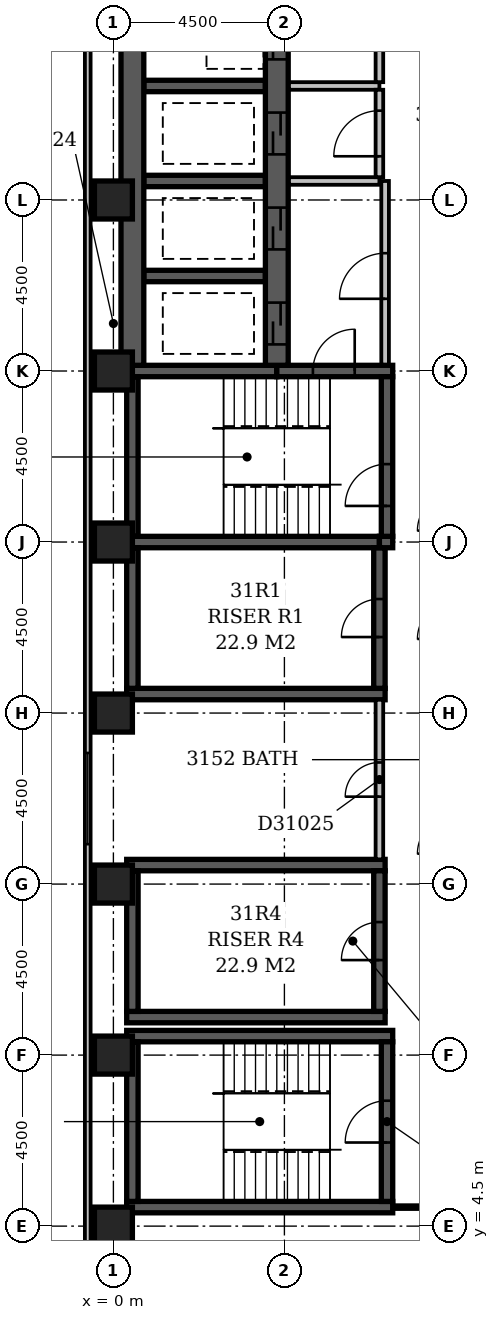
"""IFC4 building model, lengths in metres.
Left out: names, types, materials, properties, quantities, classifications, styles, units other than length and angle.
Written with IfcOpenShell. Run it as: python <this file> out.ifc"""

import sys

from ifc_helpers import new_model, si_unit, direction, frame, frame_2d, origin, origin_2d, place, context, subcontext, project, spatial, rectangle, extrude, element, fill, save


model = new_model("IFC4")
c1 = context("Model", 3, precision=1e-05, world=origin(), true_north=direction((0.0, 1.0)))
c2 = subcontext(c1, "Body", "Model", "MODEL_VIEW")
j1 = project(units=[si_unit("LENGTHUNIT", "METRE"), si_unit("PLANEANGLEUNIT", "RADIAN")], contexts=[c1])
p1 = place(None, origin())
s1 = spatial("IfcSite", under=j1, at=p1, CompositionType="ELEMENT")
p2 = place(p1, origin())
s2 = spatial("IfcBuilding", under=s1, at=p2, CompositionType="ELEMENT")
p3 = place(p2, frame((0.0, 0.0, 126.8)))
s3 = spatial("IfcBuildingStorey", under=s2, at=p3, CompositionType="ELEMENT", Elevation=126.8)
for number, where, z_axis, x_axis in (
    (1, (0.35, 5.0, -0.3), (0.0, 0.0, 1.0), (1.0, 0.0, 0.0)),
    (2, (0.35, 9.5, -0.3), (0.0, 0.0, 1.0), (1.0, 0.0, 0.0)),
):
    element("IfcWall", number, at=place(p3, frame(where, z_axis=z_axis, x_axis=x_axis)), inside=s3, PredefinedType="SHEAR", context=c2, shape_type="SweptSolid", body=[
        extrude(rectangle(XDim=7.0, YDim=0.3, at=frame_2d((3.5, 0.0))), origin(), (0.0, 0.0, 1.0), 3.6),
    ])
for number, where, z_axis, x_axis in (
    (3, (0.35, 10.0, -0.3), (0.0, 0.0, 1.0), (1.0, 0.0, 0.0)),
    (4, (0.35, 14.0, -0.3), (0.0, 0.0, 1.0), (1.0, 0.0, 0.0)),
    (5, (0.35, 18.5, -0.3), (0.0, 0.0, 1.0), (1.0, 0.0, 0.0)),
):
    element("IfcWall", number, at=place(p3, frame(where, z_axis=z_axis, x_axis=x_axis)), inside=s3, PredefinedType="SHEAR", context=c2, shape_type="SweptSolid", body=[
        extrude(rectangle(XDim=6.8, YDim=0.3, at=frame_2d((3.4, 0.0))), origin(), (0.0, 0.0, 1.0), 3.6),
    ])
p4 = place(p3, frame((0.35, 22.5, -0.3), z_axis=(0.0, 0.0, 1.0), x_axis=(1.0, 0.0, 0.0)))
e6 = element("IfcWall", 6, at=p4, inside=s3, PredefinedType="SHEAR", context=c2, shape_type="SweptSolid", body=[
    extrude(rectangle(XDim=6.65, YDim=0.3, at=frame_2d((3.325, 0.0))), origin(), (0.0, 0.0, 1.0), 3.6),
])
p5 = place(p3, frame((0.35, 27.0, -0.3), z_axis=(0.0, 0.0, 1.0), x_axis=(1.0, 0.0, 0.0)))
e7 = element("IfcWall", 7, at=p5, inside=s3, PredefinedType="SHEAR", context=c2, shape_type="SweptSolid", body=[
    extrude(rectangle(XDim=3.95, YDim=0.3, at=frame_2d((1.975, 0.0))), origin(), (0.0, 0.0, 1.0), 3.6),
])
p6 = place(p3, frame((0.5, 5.15, -0.3), z_axis=(0.0, 0.0, 1.0), x_axis=(0.0, 1.0, 0.0)))
e8 = element("IfcWall", 8, at=p6, inside=s3, PredefinedType="SHEAR", context=c2, shape_type="SweptSolid", body=[
    extrude(rectangle(XDim=4.2, YDim=0.3, at=frame_2d((2.1, 0.0))), origin(), (0.0, 0.0, 1.0), 3.6),
])
for number, where, z_axis, x_axis in (
    (9, (0.5, 10.15, -0.3), (0.0, 0.0, 1.0), (0.0, 1.0, 0.0)),
    (10, (0.5, 18.65, -0.3), (0.0, 0.0, 1.0), (0.0, 1.0, 0.0)),
):
    element("IfcWall", number, at=place(p3, frame(where, z_axis=z_axis, x_axis=x_axis)), inside=s3, PredefinedType="SHEAR", context=c2, shape_type="SweptSolid", body=[
        extrude(rectangle(XDim=3.7, YDim=0.3, at=frame_2d((1.85, 0.0))), origin(), (0.0, 0.0, 1.0), 3.6),
    ])
p7 = place(p3, frame((0.5, 22.65, -0.3), z_axis=(0.0, 0.0, 1.0), x_axis=(0.0, 1.0, 0.0)))
e11 = element("IfcWall", 11, at=p7, inside=s3, PredefinedType="SHEAR", context=c2, shape_type="SweptSolid", body=[
    extrude(rectangle(XDim=4.2, YDim=0.3, at=frame_2d((2.1, 0.0))), origin(), (0.0, 0.0, 1.0), 3.6),
])
p8 = place(p3, frame((0.5, 27.15, -0.3), z_axis=(0.0, 0.0, 1.0), x_axis=(0.0, 1.0, 0.0)))
e12 = element("IfcWall", 12, at=p8, inside=s3, PredefinedType="SHEAR", context=c2, shape_type="SweptSolid", body=[
    extrude(rectangle(XDim=22.05, YDim=0.6, at=frame_2d((11.025, 0.0))), origin(), (0.0, 0.0, 1.0), 3.6),
])
for number, where, z_axis, x_axis in (
    (13, (0.8, 29.5, -0.3), (0.0, 0.0, 1.0), (1.0, 0.0, 0.0)),
    (14, (0.8, 32.0, -0.3), (0.0, 0.0, 1.0), (1.0, 0.0, 0.0)),
    (15, (0.8, 34.5, -0.3), (0.0, 0.0, 1.0), (1.0, 0.0, 0.0)),
):
    element("IfcWall", number, at=place(p3, frame(where, z_axis=z_axis, x_axis=x_axis)), inside=s3, PredefinedType="SHEAR", context=c2, shape_type="SweptSolid", body=[
        extrude(rectangle(XDim=3.2, YDim=0.3, at=frame_2d((1.6, 0.0))), origin(), (0.0, 0.0, 1.0), 3.6),
    ])
p9 = place(p3, frame((4.3, 27.0, -0.3), z_axis=(0.0, 0.0, 1.0), x_axis=(1.0, 0.0, 0.0)))
e16 = element("IfcWall", 16, at=p9, inside=s3, PredefinedType="SHEAR", context=c2, shape_type="SweptSolid", body=[
    extrude(rectangle(XDim=3.05, YDim=0.3, at=frame_2d((1.525, 0.0))), origin(), (0.0, 0.0, 1.0), 3.6),
])
p10 = place(p9, frame((0.95, 0.0, 0.3)))
e17 = element("IfcOpeningElement", 17, at=p10, cuts=e16, PredefinedType="OPENING", context=c2, shape_type="SweptSolid", body=[
    extrude(rectangle(XDim=1.1, YDim=2.1, at=frame_2d((0.55, 1.05))), frame((0.0, 0.162, 0.0), z_axis=(0.0, -1.0, 0.0), x_axis=(1.0, 0.0, 0.0)), (0.0, 0.0, 1.0), 0.324),
])
p11 = place(p3, frame((4.3, 27.15, -0.3), z_axis=(0.0, 0.0, 1.0), x_axis=(0.0, 1.0, 0.0)))
e18 = element("IfcWall", 18, at=p11, inside=s3, PredefinedType="SHEAR", context=c2, shape_type="SweptSolid", body=[
    extrude(rectangle(XDim=22.05, YDim=0.6, at=frame_2d((11.025, 0.0))), origin(), (0.0, 0.0, 1.0), 3.6),
])
p12 = place(p11, frame((3.05, 0.0, 0.3)))
e19 = element("IfcOpeningElement", 19, at=p12, cuts=e18, PredefinedType="OPENING", context=c2, shape_type="SweptSolid", body=[
    extrude(rectangle(XDim=1.1, YDim=2.1, at=frame_2d((0.55, 1.05))), frame((0.0, 0.312, 0.0), z_axis=(0.0, -1.0, 0.0), x_axis=(1.0, 0.0, 0.0)), (0.0, 0.0, 1.0), 0.624),
])
p13 = place(p11, frame((0.55, 0.0, 0.3)))
e20 = element("IfcOpeningElement", 20, at=p13, cuts=e18, PredefinedType="OPENING", context=c2, shape_type="SweptSolid", body=[
    extrude(rectangle(XDim=1.1, YDim=2.1, at=frame_2d((0.55, 1.05))), frame((0.0, 0.312, 0.0), z_axis=(0.0, -1.0, 0.0), x_axis=(1.0, 0.0, 0.0)), (0.0, 0.0, 1.0), 0.624),
])
p14 = place(p11, frame((20.55, 0.0, 0.3)))
e21 = element("IfcOpeningElement", 21, at=p14, cuts=e18, PredefinedType="OPENING", context=c2, shape_type="SweptSolid", body=[
    extrude(rectangle(XDim=1.1, YDim=2.1, at=frame_2d((0.55, 1.05))), frame((0.0, 0.312, 0.0), z_axis=(0.0, -1.0, 0.0), x_axis=(1.0, 0.0, 0.0)), (0.0, 0.0, 1.0), 0.624),
])
p15 = place(p11, frame((18.05, 0.0, 0.3)))
e22 = element("IfcOpeningElement", 22, at=p15, cuts=e18, PredefinedType="OPENING", context=c2, shape_type="SweptSolid", body=[
    extrude(rectangle(XDim=1.1, YDim=2.1, at=frame_2d((0.55, 1.05))), frame((0.0, 0.312, 0.0), z_axis=(0.0, -1.0, 0.0), x_axis=(1.0, 0.0, 0.0)), (0.0, 0.0, 1.0), 0.624),
])
p16 = place(p11, frame((15.55, 0.0, 0.3)))
e23 = element("IfcOpeningElement", 23, at=p16, cuts=e18, PredefinedType="OPENING", context=c2, shape_type="SweptSolid", body=[
    extrude(rectangle(XDim=1.1, YDim=2.1, at=frame_2d((0.55, 1.05))), frame((0.0, 0.312, 0.0), z_axis=(0.0, -1.0, 0.0), x_axis=(1.0, 0.0, 0.0)), (0.0, 0.0, 1.0), 0.624),
])
p17 = place(p11, frame((13.05, 0.0, 0.3)))
e24 = element("IfcOpeningElement", 24, at=p17, cuts=e18, PredefinedType="OPENING", context=c2, shape_type="SweptSolid", body=[
    extrude(rectangle(XDim=1.1, YDim=2.1, at=frame_2d((0.55, 1.05))), frame((0.0, 0.312, 0.0), z_axis=(0.0, -1.0, 0.0), x_axis=(1.0, 0.0, 0.0)), (0.0, 0.0, 1.0), 0.624),
])
p18 = place(p11, frame((10.55, 0.0, 0.3)))
e25 = element("IfcOpeningElement", 25, at=p18, cuts=e18, PredefinedType="OPENING", context=c2, shape_type="SweptSolid", body=[
    extrude(rectangle(XDim=1.1, YDim=2.1, at=frame_2d((0.55, 1.05))), frame((0.0, 0.312, 0.0), z_axis=(0.0, -1.0, 0.0), x_axis=(1.0, 0.0, 0.0)), (0.0, 0.0, 1.0), 0.624),
])
p19 = place(p11, frame((8.05, 0.0, 0.3)))
e26 = element("IfcOpeningElement", 26, at=p19, cuts=e18, PredefinedType="OPENING", context=c2, shape_type="SweptSolid", body=[
    extrude(rectangle(XDim=1.1, YDim=2.1, at=frame_2d((0.55, 1.05))), frame((0.0, 0.312, 0.0), z_axis=(0.0, -1.0, 0.0), x_axis=(1.0, 0.0, 0.0)), (0.0, 0.0, 1.0), 0.624),
])
p20 = place(p11, frame((5.55, 0.0, 0.3)))
e27 = element("IfcOpeningElement", 27, at=p20, cuts=e18, PredefinedType="OPENING", context=c2, shape_type="SweptSolid", body=[
    extrude(rectangle(XDim=1.1, YDim=2.1, at=frame_2d((0.55, 1.05))), frame((0.0, 0.312, 0.0), z_axis=(0.0, -1.0, 0.0), x_axis=(1.0, 0.0, 0.0)), (0.0, 0.0, 1.0), 0.624),
])
p21 = place(p3, frame((7.0, 10.15, -0.3), z_axis=(0.0, 0.0, 1.0), x_axis=(0.0, 1.0, 0.0)))
e28 = element("IfcWall", 28, at=p21, inside=s3, PredefinedType="SHEAR", context=c2, shape_type="SweptSolid", body=[
    extrude(rectangle(XDim=3.7, YDim=0.3, at=frame_2d((1.85, 0.0))), origin(), (0.0, 0.0, 1.0), 3.6),
])
p22 = place(p21, frame((1.35, 0.0, 0.3)))
e29 = element("IfcOpeningElement", 29, at=p22, cuts=e28, PredefinedType="OPENING", context=c2, shape_type="SweptSolid", body=[
    extrude(rectangle(XDim=1.0, YDim=2.1, at=frame_2d((0.5, 1.05))), frame((0.0, 0.162, 0.0), z_axis=(0.0, -1.0, 0.0), x_axis=(1.0, 0.0, 0.0)), (0.0, 0.0, 1.0), 0.324),
])
p23 = place(p3, frame((7.0, 18.65, -0.3), z_axis=(0.0, 0.0, 1.0), x_axis=(0.0, 1.0, 0.0)))
e30 = element("IfcWall", 30, at=p23, inside=s3, PredefinedType="SHEAR", context=c2, shape_type="SweptSolid", body=[
    extrude(rectangle(XDim=3.7, YDim=0.3, at=frame_2d((1.85, 0.0))), origin(), (0.0, 0.0, 1.0), 3.6),
])
p24 = place(p23, frame((1.35, 0.0, 0.3)))
e31 = element("IfcOpeningElement", 31, at=p24, cuts=e30, PredefinedType="OPENING", context=c2, shape_type="SweptSolid", body=[
    extrude(rectangle(XDim=1.0, YDim=2.1, at=frame_2d((0.5, 1.05))), frame((0.0, 0.162, 0.0), z_axis=(0.0, -1.0, 0.0), x_axis=(1.0, 0.0, 0.0)), (0.0, 0.0, 1.0), 0.324),
])
p25 = place(p3, frame((7.0, 22.5, -0.3), z_axis=(0.0, 0.0, 1.0), x_axis=(1.0, 0.0, 0.0)))
e32 = element("IfcWall", 32, at=p25, inside=s3, PredefinedType="SHEAR", context=c2, shape_type="SweptSolid", body=[
    extrude(rectangle(XDim=0.35, YDim=0.3, at=frame_2d((0.175, 0.0))), origin(), (0.0, 0.0, 1.0), 3.6),
])
p26 = place(p3, frame((7.2, 5.15, -0.3), z_axis=(0.0, 0.0, 1.0), x_axis=(0.0, 1.0, 0.0)))
e33 = element("IfcWall", 33, at=p26, inside=s3, PredefinedType="SHEAR", context=c2, shape_type="SweptSolid", body=[
    extrude(rectangle(XDim=4.2, YDim=0.3, at=frame_2d((2.1, 0.0))), origin(), (0.0, 0.0, 1.0), 3.6),
])
p27 = place(p26, frame((1.55, 0.0, 0.3)))
e34 = element("IfcOpeningElement", 34, at=p27, cuts=e33, PredefinedType="OPENING", context=c2, shape_type="SweptSolid", body=[
    extrude(rectangle(XDim=1.1, YDim=2.1, at=frame_2d((0.55, 1.05))), frame((0.0, 0.162, 0.0), z_axis=(0.0, -1.0, 0.0), x_axis=(1.0, 0.0, 0.0)), (0.0, 0.0, 1.0), 0.324),
])
p28 = place(p3, frame((7.2, 22.65, -0.3), z_axis=(0.0, 0.0, 1.0), x_axis=(0.0, 1.0, 0.0)))
e35 = element("IfcWall", 35, at=p28, inside=s3, PredefinedType="SHEAR", context=c2, shape_type="SweptSolid", body=[
    extrude(rectangle(XDim=4.2, YDim=0.3, at=frame_2d((2.1, 0.0))), origin(), (0.0, 0.0, 1.0), 3.6),
])
p29 = place(p28, frame((0.8, 0.0, 0.3)))
e36 = element("IfcOpeningElement", 36, at=p29, cuts=e35, PredefinedType="OPENING", context=c2, shape_type="SweptSolid", body=[
    extrude(rectangle(XDim=1.1, YDim=2.1, at=frame_2d((0.55, 1.05))), frame((0.0, 0.162, 0.0), z_axis=(0.0, -1.0, 0.0), x_axis=(1.0, 0.0, 0.0)), (0.0, 0.0, 1.0), 0.324),
])
for number, where, z_axis, x_axis in (
    (37, (0.0, 4.5, -0.3), (0.0, 0.0, 1.0), (1.0, 0.0, 0.0)),
    (38, (0.0, 9.0, -0.3), (0.0, 0.0, 1.0), (1.0, 0.0, 0.0)),
    (39, (0.0, 13.5, -0.3), (0.0, 0.0, 1.0), (1.0, 0.0, 0.0)),
    (40, (0.0, 18.0, -0.3), (0.0, 0.0, 1.0), (1.0, 0.0, 0.0)),
    (41, (0.0, 22.5, -0.3), (0.0, 0.0, 1.0), (1.0, 0.0, 0.0)),
    (42, (0.0, 27.0, -0.3), (0.0, 0.0, 1.0), (1.0, 0.0, 0.0)),
    (43, (0.0, 31.5, -0.3), (0.0, 0.0, 1.0), (1.0, 0.0, 0.0)),
):
    element("IfcColumn", number, at=place(p3, frame(where, z_axis=z_axis, x_axis=x_axis)), inside=s3, PredefinedType="COLUMN", context=c2, shape_type="SweptSolid", body=[
        extrude(rectangle(XDim=1.0, YDim=1.0, at=origin_2d()), origin(), (0.0, 0.0, 1.0), 3.6),
    ])
p30 = place(p3, frame((-0.675, 59.1, 0.0), z_axis=(0.0, 0.0, 1.0), x_axis=(0.0, -1.0, 0.0)))
e44 = element("IfcWall", 44, at=p30, inside=s3, PredefinedType="STANDARD", context=c2, shape_type="SweptSolid", body=[
    extrude(rectangle(XDim=55.35, YDim=0.15, at=frame_2d((27.675, 0.0))), origin(), (0.0, 0.0, 1.0), 2.7),
])
p31 = place(p30, frame((42.15, 0.0, 0.6)))
e45 = element("IfcOpeningElement", 45, at=p31, cuts=e44, PredefinedType="OPENING", context=c2, shape_type="SweptSolid", body=[
    extrude(rectangle(XDim=2.4, YDim=1.8, at=frame_2d((1.2, 0.9))), frame((0.0, 0.087, 0.0), z_axis=(0.0, -1.0, 0.0), x_axis=(1.0, 0.0, 0.0)), (0.0, 0.0, 1.0), 0.174),
])
p32 = place(p3, frame((4.62, 34.5, 0.0), z_axis=(0.0, 0.0, 1.0), x_axis=(1.0, 0.0, 0.0)))
e46 = element("IfcWall", 46, at=p32, inside=s3, PredefinedType="PARTITIONING", context=c2, shape_type="SweptSolid", body=[
    extrude(rectangle(XDim=2.38, YDim=0.2, at=frame_2d((1.19, 0.0))), origin(), (0.0, 0.0, 1.0), 3.3),
])
p33 = place(p3, frame((7.0, 34.6, 0.0), z_axis=(0.0, 0.0, 1.0), x_axis=(0.0, 1.0, 0.0)))
e47 = element("IfcWall", 47, at=p33, inside=s3, PredefinedType="PARTITIONING", context=c2, shape_type="SweptSolid", body=[
    extrude(rectangle(XDim=14.9, YDim=0.2, at=frame_2d((7.45, 0.0))), origin(), (0.0, 0.0, 1.0), 3.3),
])
p34 = place(p33, frame((2.8, 0.0, 0.0)))
e48 = element("IfcOpeningElement", 48, at=p34, cuts=e47, PredefinedType="OPENING", context=c2, shape_type="SweptSolid", body=[
    extrude(rectangle(XDim=1.2, YDim=2.1, at=frame_2d((0.6, 1.05))), frame((0.0, 0.112, 0.0), z_axis=(0.0, -1.0, 0.0), x_axis=(1.0, 0.0, 0.0)), (0.0, 0.0, 1.0), 0.224),
])
p35 = place(p33, frame((9.8, 0.0, 0.0)))
e49 = element("IfcOpeningElement", 49, at=p35, cuts=e47, PredefinedType="OPENING", context=c2, shape_type="SweptSolid", body=[
    extrude(rectangle(XDim=1.2, YDim=2.1, at=frame_2d((0.6, 1.05))), frame((0.0, 0.112, 0.0), z_axis=(0.0, -1.0, 0.0), x_axis=(1.0, 0.0, 0.0)), (0.0, 0.0, 1.0), 0.224),
])
p36 = place(p3, frame((4.62, 32.0, 0.0), z_axis=(0.0, 0.0, 1.0), x_axis=(1.0, 0.0, 0.0)))
e50 = element("IfcWall", 50, at=p36, inside=s3, PredefinedType="PARTITIONING", context=c2, shape_type="SweptSolid", body=[
    extrude(rectangle(XDim=2.38, YDim=0.2, at=frame_2d((1.19, 0.0))), origin(), (0.0, 0.0, 1.0), 3.3),
])
p37 = place(p3, frame((7.0, 32.1, 0.0), z_axis=(0.0, 0.0, 1.0), x_axis=(0.0, 1.0, 0.0)))
e51 = element("IfcWall", 51, at=p37, inside=s3, PredefinedType="PARTITIONING", context=c2, shape_type="SweptSolid", body=[
    extrude(rectangle(XDim=2.3, YDim=0.2, at=frame_2d((1.15, 0.0))), origin(), (0.0, 0.0, 1.0), 3.3),
])
p38 = place(p37, frame((0.55, 0.0, 0.0)))
e52 = element("IfcOpeningElement", 52, at=p38, cuts=e51, PredefinedType="OPENING", context=c2, shape_type="SweptSolid", body=[
    extrude(rectangle(XDim=1.2, YDim=2.1, at=frame_2d((0.6, 1.05))), frame((0.0, 0.112, 0.0), z_axis=(0.0, -1.0, 0.0), x_axis=(1.0, 0.0, 0.0)), (0.0, 0.0, 1.0), 0.224),
])
p39 = place(p3, frame((7.15, 27.17, 0.0), z_axis=(0.0, 0.0, 1.0), x_axis=(0.0, 1.0, 0.0)))
e53 = element("IfcWall", 53, at=p39, inside=s3, PredefinedType="PARTITIONING", context=c2, shape_type="SweptSolid", body=[
    extrude(rectangle(XDim=4.83, YDim=0.2, at=frame_2d((2.415, 0.0))), origin(), (0.0, 0.0, 1.0), 3.3),
])
p40 = place(p39, frame((1.73, 0.0, 0.0)))
e54 = element("IfcOpeningElement", 54, at=p40, cuts=e53, PredefinedType="OPENING", context=c2, shape_type="SweptSolid", body=[
    extrude(rectangle(XDim=1.2, YDim=2.1, at=frame_2d((0.6, 1.05))), frame((0.0, 0.112, 0.0), z_axis=(0.0, -1.0, 0.0), x_axis=(1.0, 0.0, 0.0)), (0.0, 0.0, 1.0), 0.224),
])
p41 = place(p3, frame((0.0, 4.5, 0.0), z_axis=(0.0, 0.0, 1.0), x_axis=(0.0, 1.0, 0.0)))
e55 = element("IfcWall", 55, at=p41, inside=s3, PredefinedType="PARTITIONING", context=c2, shape_type="SweptSolid", body=[
    extrude(rectangle(XDim=0.5, YDim=0.1, at=frame_2d((0.25, 0.0))), origin(), (0.0, 0.0, 1.0), 2.7),
])
p42 = place(p3, frame((7.349, 5.0, 0.0), z_axis=(0.0, 0.0, 1.0), x_axis=(1.0, 0.0, 0.0)))
e56 = element("IfcWall", 56, at=p42, inside=s3, PredefinedType="PARTITIONING", context=c2, shape_type="SweptSolid", body=[
    extrude(rectangle(XDim=1.551, YDim=0.1, at=frame_2d((0.775, 0.0))), origin(), (0.0, 0.0, 1.0), 3.3),
])
p43 = place(p3, frame((7.0, 14.15, 0.0), z_axis=(0.0, 0.0, 1.0), x_axis=(0.0, 1.0, 0.0)))
e57 = element("IfcWall", 57, at=p43, inside=s3, PredefinedType="PARTITIONING", context=c2, shape_type="SweptSolid", body=[
    extrude(rectangle(XDim=4.2, YDim=0.2, at=frame_2d((2.1, 0.0))), origin(), (0.0, 0.0, 1.0), 3.3),
])
p44 = place(p43, frame((1.65, 0.0, 0.0)))
e58 = element("IfcOpeningElement", 58, at=p44, cuts=e57, PredefinedType="OPENING", context=c2, shape_type="SweptSolid", body=[
    extrude(rectangle(XDim=0.9, YDim=2.1, at=frame_2d((0.45, 1.05))), frame((0.0, 0.112, 0.0), z_axis=(0.0, -1.0, 0.0), x_axis=(1.0, 0.0, 0.0)), (0.0, 0.0, 1.0), 0.224),
])
p45 = place(p31, origin())
e59 = element("IfcWindow", 59, at=p45, inside=s3, PartitioningType="SINGLE_PANEL", PredefinedType="WINDOW", context=c2, shape_type="SweptSolid", body=[
    extrude(rectangle(XDim=2.4, YDim=1.8, at=frame_2d((1.2, 0.9))), frame((0.0, 0.03, 0.0), z_axis=(0.0, -1.0, 0.0), x_axis=(1.0, 0.0, 0.0)), (0.0, 0.0, 1.0), 0.06),
])
fill(e45, e59)
p46 = place(p40, origin())
e60 = element("IfcDoor", 60, at=p46, inside=s3, OperationType="SINGLE_SWING_LEFT", PredefinedType="DOOR", context=c2, shape_type="SweptSolid", body=[
    extrude(rectangle(XDim=1.2, YDim=2.1, at=frame_2d((0.6, 1.05))), frame((0.0, 0.025, 0.0), z_axis=(0.0, -1.0, 0.0), x_axis=(1.0, 0.0, 0.0)), (0.0, 0.0, 1.0), 0.05),
])
fill(e54, e60)
p47 = place(p12, origin())
e61 = element("IfcDoor", 61, at=p47, inside=s3, OperationType="SLIDING_TO_LEFT", PredefinedType="DOOR", context=c2, shape_type="SweptSolid", body=[
    extrude(rectangle(XDim=1.1, YDim=2.1, at=frame_2d((0.55, 1.05))), frame((0.0, 0.025, 0.0), z_axis=(0.0, -1.0, 0.0), x_axis=(1.0, 0.0, 0.0)), (0.0, 0.0, 1.0), 0.05),
])
fill(e19, e61)
p48 = place(p13, origin())
e62 = element("IfcDoor", 62, at=p48, inside=s3, OperationType="SLIDING_TO_LEFT", PredefinedType="DOOR", context=c2, shape_type="SweptSolid", body=[
    extrude(rectangle(XDim=1.1, YDim=2.1, at=frame_2d((0.55, 1.05))), frame((0.0, 0.025, 0.0), z_axis=(0.0, -1.0, 0.0), x_axis=(1.0, 0.0, 0.0)), (0.0, 0.0, 1.0), 0.05),
])
fill(e20, e62)
p49 = place(p19, origin())
e63 = element("IfcDoor", 63, at=p49, inside=s3, OperationType="SLIDING_TO_LEFT", PredefinedType="DOOR", context=c2, shape_type="SweptSolid", body=[
    extrude(rectangle(XDim=1.1, YDim=2.1, at=frame_2d((0.55, 1.05))), frame((0.0, 0.025, 0.0), z_axis=(0.0, -1.0, 0.0), x_axis=(1.0, 0.0, 0.0)), (0.0, 0.0, 1.0), 0.05),
])
fill(e26, e63)
p50 = place(p38, origin())
e64 = element("IfcDoor", 64, at=p50, inside=s3, OperationType="SINGLE_SWING_LEFT", PredefinedType="DOOR", context=c2, shape_type="SweptSolid", body=[
    extrude(rectangle(XDim=1.2, YDim=2.1, at=frame_2d((0.6, 1.05))), frame((0.0, 0.025, 0.0), z_axis=(0.0, -1.0, 0.0), x_axis=(1.0, 0.0, 0.0)), (0.0, 0.0, 1.0), 0.05),
])
fill(e52, e64)
p51 = place(p20, origin())
e65 = element("IfcDoor", 65, at=p51, inside=s3, OperationType="SLIDING_TO_LEFT", PredefinedType="DOOR", context=c2, shape_type="SweptSolid", body=[
    extrude(rectangle(XDim=1.1, YDim=2.1, at=frame_2d((0.55, 1.05))), frame((0.0, 0.025, 0.0), z_axis=(0.0, -1.0, 0.0), x_axis=(1.0, 0.0, 0.0)), (0.0, 0.0, 1.0), 0.05),
])
fill(e27, e65)
p52 = place(p24, origin())
e66 = element("IfcDoor", 66, at=p52, inside=s3, OperationType="SINGLE_SWING_LEFT", PredefinedType="DOOR", context=c2, shape_type="SweptSolid", body=[
    extrude(rectangle(XDim=1.0, YDim=2.1, at=frame_2d((0.5, 1.05))), frame((0.0, 0.025, 0.0), z_axis=(0.0, -1.0, 0.0), x_axis=(1.0, 0.0, 0.0)), (0.0, 0.0, 1.0), 0.05),
])
fill(e31, e66)
p53 = place(p22, origin())
e67 = element("IfcDoor", 67, at=p53, inside=s3, OperationType="SINGLE_SWING_LEFT", PredefinedType="DOOR", context=c2, shape_type="SweptSolid", body=[
    extrude(rectangle(XDim=1.0, YDim=2.1, at=frame_2d((0.5, 1.05))), frame((0.0, 0.025, 0.0), z_axis=(0.0, -1.0, 0.0), x_axis=(1.0, 0.0, 0.0)), (0.0, 0.0, 1.0), 0.05),
])
fill(e29, e67)
p54 = place(p10, frame((1.1, 0.0, 0.0), z_axis=(0.0, 0.0, 1.0), x_axis=(-1.0, 0.0, 0.0)))
e68 = element("IfcDoor", 68, at=p54, inside=s3, OperationType="SINGLE_SWING_LEFT", PredefinedType="DOOR", context=c2, shape_type="SweptSolid", body=[
    extrude(rectangle(XDim=1.1, YDim=2.1, at=frame_2d((0.55, 1.05))), frame((0.0, 0.025, 0.0), z_axis=(0.0, -1.0, 0.0), x_axis=(1.0, 0.0, 0.0)), (0.0, 0.0, 1.0), 0.05),
])
fill(e17, e68)
p55 = place(p29, origin())
e69 = element("IfcDoor", 69, at=p55, inside=s3, OperationType="SINGLE_SWING_LEFT", PredefinedType="DOOR", context=c2, shape_type="SweptSolid", body=[
    extrude(rectangle(XDim=1.1, YDim=2.1, at=frame_2d((0.55, 1.05))), frame((0.0, 0.025, 0.0), z_axis=(0.0, -1.0, 0.0), x_axis=(1.0, 0.0, 0.0)), (0.0, 0.0, 1.0), 0.05),
])
fill(e36, e69)
p56 = place(p27, origin())
e70 = element("IfcDoor", 70, at=p56, inside=s3, OperationType="SINGLE_SWING_LEFT", PredefinedType="DOOR", context=c2, shape_type="SweptSolid", body=[
    extrude(rectangle(XDim=1.1, YDim=2.1, at=frame_2d((0.55, 1.05))), frame((0.0, 0.025, 0.0), z_axis=(0.0, -1.0, 0.0), x_axis=(1.0, 0.0, 0.0)), (0.0, 0.0, 1.0), 0.05),
])
fill(e34, e70)
p57 = place(p44, origin())
e71 = element("IfcDoor", 71, at=p57, inside=s3, OperationType="SINGLE_SWING_LEFT", PredefinedType="DOOR", context=c2, shape_type="SweptSolid", body=[
    extrude(rectangle(XDim=0.9, YDim=2.1, at=frame_2d((0.45, 1.05))), frame((0.0, 0.025, 0.0), z_axis=(0.0, -1.0, 0.0), x_axis=(1.0, 0.0, 0.0)), (0.0, 0.0, 1.0), 0.05),
])
fill(e58, e71)
save(model, sys.argv[1])
